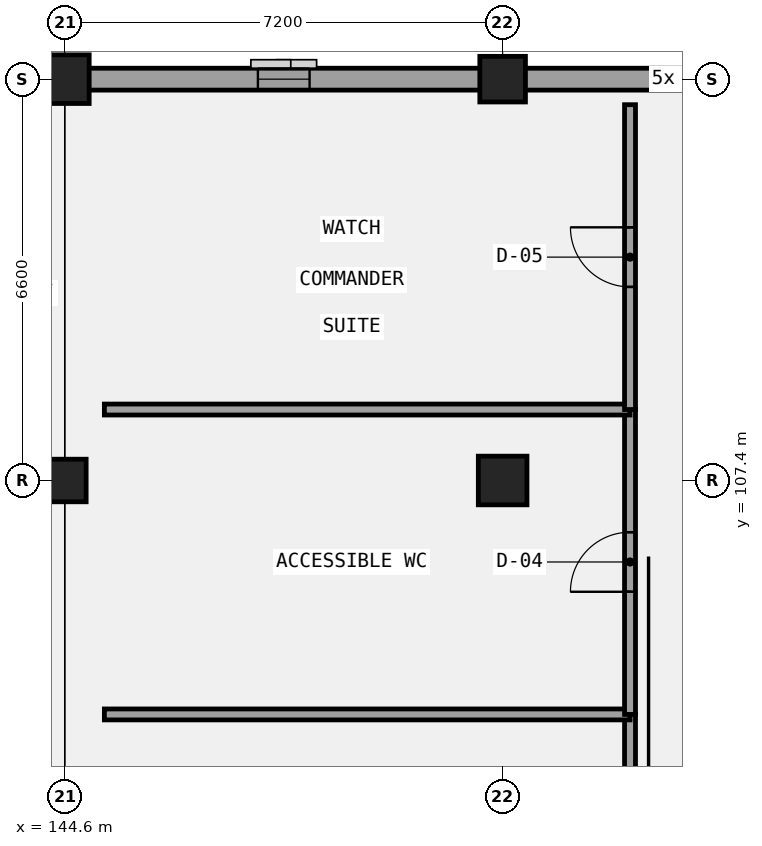
"""IFC4 building model, lengths in metres.
Left out: names, types, materials, properties, quantities, classifications, styles, units other than length and angle.
Written with IfcOpenShell. Run it as: python <this file> out.ifc"""

import sys

from ifc_helpers import new_model, si_unit, direction, frame, frame_2d, origin, origin_2d, place, context, subcontext, project, spatial, rectangle, extrude, element, fill, save


model = new_model("IFC4")
c1 = context("Model", 3, precision=1e-05, world=origin(), true_north=direction((0.0, 1.0)))
c2 = subcontext(c1, "Body", "Model", "MODEL_VIEW")
j1 = project(units=[si_unit("LENGTHUNIT", "METRE"), si_unit("PLANEANGLEUNIT", "RADIAN")], contexts=[c1])
p1 = place(None, origin())
s1 = spatial("IfcSite", under=j1, at=p1, CompositionType="ELEMENT")
p2 = place(p1, origin())
s2 = spatial("IfcBuilding", under=s1, at=p2, CompositionType="ELEMENT")
p3 = place(p2, origin())
s3 = spatial("IfcBuildingStorey", under=s2, at=p3, CompositionType="ELEMENT", Elevation=0.0)
p4 = place(p3, frame((144.6, 107.4, 0.0), z_axis=(0.0, 0.0, 1.0), x_axis=(1.0, 0.0, 0.0)))
e1 = element("IfcColumn", 1, at=p4, inside=s3, PredefinedType="COLUMN", context=c2, shape_type="SweptSolid", body=[
    extrude(rectangle(XDim=0.7, YDim=0.7, at=origin_2d()), origin(), (0.0, 0.0, 1.0), 5.4),
])
for number, where, z_axis, x_axis in (
    (2, (144.6, 114.0, 0.0), (0.0, 0.0, 1.0), (1.0, 0.0, 0.0)),
    (3, (151.8, 107.4, 0.0), (0.0, 0.0, 1.0), (1.0, 0.0, 0.0)),
):
    element("IfcColumn", number, at=place(p3, frame(where, z_axis=z_axis, x_axis=x_axis)), inside=s3, PredefinedType="COLUMN", context=c2, shape_type="SweptSolid", body=[
        extrude(rectangle(XDim=0.8, YDim=0.8, at=origin_2d()), origin(), (0.0, 0.0, 1.0), 5.4),
    ])
p5 = place(p3, frame((151.8, 114.0, 0.0), z_axis=(0.0, 0.0, 1.0), x_axis=(1.0, 0.0, 0.0)))
e4 = element("IfcColumn", 4, at=p5, inside=s3, PredefinedType="COLUMN", context=c2, shape_type="SweptSolid", body=[
    extrude(rectangle(XDim=0.75, YDim=0.75, at=origin_2d()), origin(), (0.0, 0.0, 1.0), 5.4),
])
p6 = place(p3, frame((166.38, 114.0, 0.0), z_axis=(0.0, 0.0, 1.0), x_axis=(-1.0, 0.0, 0.0)))
e5 = element("IfcWall", 5, at=p6, inside=s3, PredefinedType="SOLIDWALL", context=c2, shape_type="SweptSolid", body=[
    extrude(rectangle(XDim=21.96, YDim=0.36, at=frame_2d((10.98, 0.0))), origin(), (0.0, 0.0, 1.0), 4.37),
])
p7 = place(p6, frame((17.755, 0.0, 0.95)))
e6 = element("IfcOpeningElement", 6, at=p7, cuts=e5, PredefinedType="OPENING", context=c2, shape_type="SweptSolid", body=[
    extrude(rectangle(XDim=0.85, YDim=1.4, at=frame_2d((0.425, 0.7))), frame((0.0, 0.19, 0.0), z_axis=(0.0, -1.0, 0.0), x_axis=(1.0, 0.0, 0.0)), (0.0, 0.0, 1.0), 0.38),
])
p8 = place(p3, frame((144.78, 114.0, 0.0), z_axis=(0.0, 0.0, 1.0), x_axis=(-1.0, 0.0, 0.0)))
e7 = element("IfcWall", 7, at=p8, inside=s3, PredefinedType="SOLIDWALL", context=c2, shape_type="SweptSolid", body=[
    extrude(rectangle(XDim=36.36, YDim=0.36, at=frame_2d((18.18, 0.0))), origin(), (0.0, 0.0, 1.0), 4.37),
])
p9 = place(p8, frame((9.908, 0.0, 0.0)))
e8 = element("IfcOpeningElement", 8, at=p9, cuts=e7, PredefinedType="OPENING", context=c2, shape_type="SweptSolid", body=[
    extrude(rectangle(XDim=2.0, YDim=2.6, at=frame_2d((1.0, 1.3))), frame((0.0, 0.19, 0.0), z_axis=(0.0, -1.0, 0.0), x_axis=(1.0, 0.0, 0.0)), (0.0, 0.0, 1.0), 0.38),
])
p10 = place(p8, frame((32.155, 0.0, 0.95)))
e9 = element("IfcOpeningElement", 9, at=p10, cuts=e7, PredefinedType="OPENING", context=c2, shape_type="SweptSolid", body=[
    extrude(rectangle(XDim=0.85, YDim=1.4, at=frame_2d((0.425, 0.7))), frame((0.0, 0.19, 0.0), z_axis=(0.0, -1.0, 0.0), x_axis=(1.0, 0.0, 0.0)), (0.0, 0.0, 1.0), 0.38),
])
p11 = place(p8, frame((24.955, 0.0, 0.95)))
e10 = element("IfcOpeningElement", 10, at=p11, cuts=e7, PredefinedType="OPENING", context=c2, shape_type="SweptSolid", body=[
    extrude(rectangle(XDim=0.85, YDim=1.65, at=frame_2d((0.425, 0.825))), frame((0.0, 0.19, 0.0), z_axis=(0.0, -1.0, 0.0), x_axis=(1.0, 0.0, 0.0)), (0.0, 0.0, 1.0), 0.38),
])
p12 = place(p8, frame((17.755, 0.0, 0.95)))
e11 = element("IfcOpeningElement", 11, at=p12, cuts=e7, PredefinedType="OPENING", context=c2, shape_type="SweptSolid", body=[
    extrude(rectangle(XDim=0.85, YDim=1.9, at=frame_2d((0.425, 0.95))), frame((0.0, 0.19, 0.0), z_axis=(0.0, -1.0, 0.0), x_axis=(1.0, 0.0, 0.0)), (0.0, 0.0, 1.0), 0.38),
])
p13 = place(p8, frame((3.355, 0.0, 0.95)))
e12 = element("IfcOpeningElement", 12, at=p13, cuts=e7, PredefinedType="OPENING", context=c2, shape_type="SweptSolid", body=[
    extrude(rectangle(XDim=0.85, YDim=2.4, at=frame_2d((0.425, 1.2))), frame((0.0, 0.19, 0.0), z_axis=(0.0, -1.0, 0.0), x_axis=(1.0, 0.0, 0.0)), (0.0, 0.0, 1.0), 0.38),
])
p14 = place(p3, frame((153.895, 98.54, 0.0), z_axis=(0.0, 0.0, 1.0), x_axis=(0.0, 1.0, 0.0)))
e13 = element("IfcWall", 13, at=p14, inside=s3, PredefinedType="PARTITIONING", context=c2, shape_type="SweptSolid", body=[
    extrude(rectangle(XDim=5.013, YDim=0.18, at=frame_2d((2.506, 0.0))), origin(), (0.0, 0.0, 1.0), 5.12),
])
p15 = place(p14, frame((2.046, 0.0, 0.0)))
e14 = element("IfcOpeningElement", 14, at=p15, cuts=e13, PredefinedType="OPENING", context=c2, shape_type="SweptSolid", body=[
    extrude(rectangle(XDim=0.92, YDim=2.35, at=frame_2d((0.46, 1.175))), frame((0.0, 0.1, 0.0), z_axis=(0.0, -1.0, 0.0), x_axis=(1.0, 0.0, 0.0)), (0.0, 0.0, 1.0), 0.2),
])
p16 = place(p3, frame((145.25, 103.553, 0.0), z_axis=(0.0, 0.0, 1.0), x_axis=(1.0, 0.0, 0.0)))
e15 = element("IfcWall", 15, at=p16, inside=s3, PredefinedType="PARTITIONING", context=c2, shape_type="SweptSolid", body=[
    extrude(rectangle(XDim=8.645, YDim=0.18, at=frame_2d((4.323, 0.0))), origin(), (0.0, 0.0, 1.0), 4.57),
])
p17 = place(p3, frame((153.895, 103.553, 0.0), z_axis=(0.0, 0.0, 1.0), x_axis=(0.0, 1.0, 0.0)))
e16 = element("IfcWall", 16, at=p17, inside=s3, PredefinedType="PARTITIONING", context=c2, shape_type="SweptSolid", body=[
    extrude(rectangle(XDim=5.014, YDim=0.18, at=frame_2d((2.507, 0.0))), origin(), (0.0, 0.0, 1.0), 5.12),
])
p18 = place(p17, frame((2.017, 0.0, 0.0)))
e17 = element("IfcOpeningElement", 17, at=p18, cuts=e16, PredefinedType="OPENING", context=c2, shape_type="SweptSolid", body=[
    extrude(rectangle(XDim=0.98, YDim=2.1, at=frame_2d((0.49, 1.05))), frame((0.0, 0.1, 0.0), z_axis=(0.0, -1.0, 0.0), x_axis=(1.0, 0.0, 0.0)), (0.0, 0.0, 1.0), 0.2),
])
p19 = place(p3, frame((145.25, 108.567, 0.0), z_axis=(0.0, 0.0, 1.0), x_axis=(1.0, 0.0, 0.0)))
e18 = element("IfcWall", 18, at=p19, inside=s3, PredefinedType="PARTITIONING", context=c2, shape_type="SweptSolid", body=[
    extrude(rectangle(XDim=8.645, YDim=0.18, at=frame_2d((4.323, 0.0))), origin(), (0.0, 0.0, 1.0), 5.12),
])
p20 = place(p3, frame((153.895, 108.567, 0.0), z_axis=(0.0, 0.0, 1.0), x_axis=(0.0, 1.0, 0.0)))
e19 = element("IfcWall", 19, at=p20, inside=s3, PredefinedType="PARTITIONING", context=c2, shape_type="SweptSolid", body=[
    extrude(rectangle(XDim=5.013, YDim=0.18, at=frame_2d((2.507, 0.0))), origin(), (0.0, 0.0, 1.0), 5.12),
])
p21 = place(p20, frame((2.017, 0.0, 0.0)))
e20 = element("IfcOpeningElement", 20, at=p21, cuts=e19, PredefinedType="OPENING", context=c2, shape_type="SweptSolid", body=[
    extrude(rectangle(XDim=0.98, YDim=2.22, at=frame_2d((0.49, 1.11))), frame((0.0, 0.1, 0.0), z_axis=(0.0, -1.0, 0.0), x_axis=(1.0, 0.0, 0.0)), (0.0, 0.0, 1.0), 0.2),
])
p22 = place(p7, origin())
e21 = element("IfcWindow", 21, at=p22, inside=s3, PartitioningType="SINGLE_PANEL", PredefinedType="WINDOW", context=c2, shape_type="SweptSolid", body=[
    extrude(rectangle(XDim=0.85, YDim=1.4, at=frame_2d((0.425, 0.7))), frame((0.0, 0.03, 0.0), z_axis=(0.0, -1.0, 0.0), x_axis=(1.0, 0.0, 0.0)), (0.0, 0.0, 1.0), 0.06),
])
fill(e6, e21)
p23 = place(p18, frame((0.98, 0.0, 0.0), z_axis=(0.0, 0.0, 1.0), x_axis=(-1.0, 0.0, 0.0)))
e22 = element("IfcDoor", 22, at=p23, inside=s3, OperationType="SINGLE_SWING_LEFT", PredefinedType="DOOR", context=c2, shape_type="SweptSolid", body=[
    extrude(rectangle(XDim=0.98, YDim=2.1, at=frame_2d((0.49, 1.05))), frame((0.0, 0.025, 0.0), z_axis=(0.0, -1.0, 0.0), x_axis=(1.0, 0.0, 0.0)), (0.0, 0.0, 1.0), 0.05),
])
fill(e17, e22)
p24 = place(p21, frame((0.98, 0.0, 0.0), z_axis=(0.0, 0.0, 1.0), x_axis=(-1.0, 0.0, 0.0)))
e23 = element("IfcDoor", 23, at=p24, inside=s3, OperationType="SINGLE_SWING_RIGHT", PredefinedType="DOOR", context=c2, shape_type="SweptSolid", body=[
    extrude(rectangle(XDim=0.98, YDim=2.22, at=frame_2d((0.49, 1.11))), frame((0.0, 0.025, 0.0), z_axis=(0.0, -1.0, 0.0), x_axis=(1.0, 0.0, 0.0)), (0.0, 0.0, 1.0), 0.05),
])
fill(e20, e23)
save(model, sys.argv[1])
